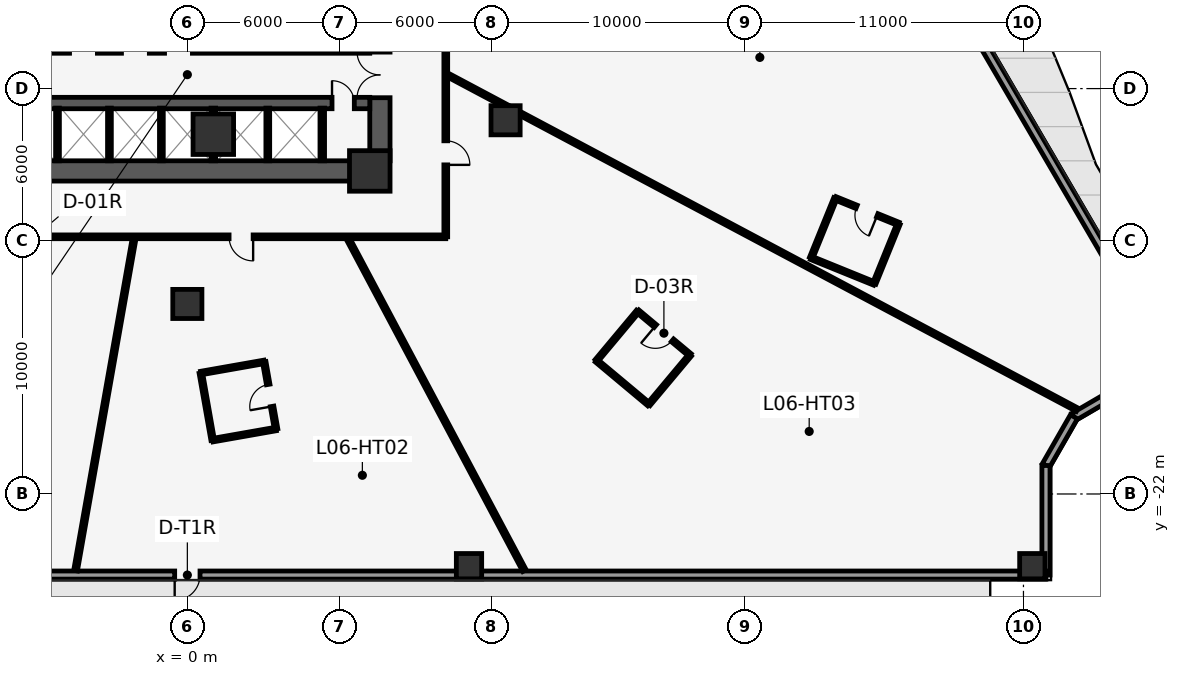
"""IFC4 building model, lengths in metres.
Left out: names, types, materials, properties, quantities, classifications, styles, units other than length and angle.
Written with IfcOpenShell. Run it as: python <this file> out.ifc"""

import sys

from ifc_helpers import new_model, si_unit, direction, frame, frame_2d, origin, origin_2d, place, context, subcontext, project, spatial, rectangle, hollow_rectangle, extrude, element, fill, save


model = new_model("IFC4")
c1 = context("Model", 3, precision=1e-05, world=origin(), true_north=direction((0.0, 1.0)))
c2 = subcontext(c1, "Body", "Model", "MODEL_VIEW")
j1 = project(units=[si_unit("LENGTHUNIT", "METRE"), si_unit("PLANEANGLEUNIT", "RADIAN")], contexts=[c1])
p1 = place(None, origin())
s1 = spatial("IfcSite", under=j1, at=p1, CompositionType="ELEMENT")
p2 = place(p1, origin())
s2 = spatial("IfcBuilding", under=s1, at=p2, CompositionType="ELEMENT")
p3 = place(p2, frame((0.0, 0.0, 34.4)))
s3 = spatial("IfcBuildingStorey", under=s2, at=p3, CompositionType="ELEMENT", Elevation=34.4)
p4 = place(p3, frame((7.6, -8.85, 0.0), z_axis=(0.0, 0.0, 1.0), x_axis=(0.0, 1.0, 0.0)))
e1 = element("IfcWall", 1, at=p4, inside=s3, PredefinedType="SHEAR", context=c2, shape_type="SweptSolid", body=[
    extrude(rectangle(XDim=8.95, YDim=0.8, at=frame_2d((4.475, 0.0))), origin(), (0.0, 0.0, 1.0), 3.75),
])
p5 = place(p4, frame((2.49, 0.0, 0.0)))
e2 = element("IfcOpeningElement", 2, at=p5, cuts=e1, PredefinedType="OPENING", context=c2, shape_type="SweptSolid", body=[
    extrude(rectangle(XDim=1.8, YDim=2.2, at=frame_2d((0.9, 1.1))), frame((0.0, 0.41, 0.0), z_axis=(0.0, -1.0, 0.0), x_axis=(1.0, 0.0, 0.0)), (0.0, 0.0, 1.0), 0.82),
])
p6 = place(p4, frame((7.4, 0.0, 0.0)))
e3 = element("IfcOpeningElement", 3, at=p6, cuts=e1, PredefinedType="OPENING", context=c2, shape_type="SweptSolid", body=[
    extrude(rectangle(XDim=1.2, YDim=2.15, at=frame_2d((0.6, 1.075))), frame((0.0, 0.41, 0.0), z_axis=(0.0, -1.0, 0.0), x_axis=(1.0, 0.0, 0.0)), (0.0, 0.0, 1.0), 0.82),
])
p7 = place(p3, frame((-7.6, -9.25, 0.0), z_axis=(0.0, 0.0, 1.0), x_axis=(1.0, 0.0, 0.0)))
e4 = element("IfcWall", 4, at=p7, inside=s3, PredefinedType="SHEAR", context=c2, shape_type="SweptSolid", body=[
    extrude(rectangle(XDim=15.2, YDim=0.8, at=frame_2d((7.6, 0.0))), origin(), (0.0, 0.0, 1.0), 3.75),
])
p8 = place(p3, frame((-7.2, -4.38, 0.0), z_axis=(0.0, 0.0, 1.0), x_axis=(1.0, 0.0, 0.0)))
e5 = element("IfcWall", 5, at=p8, inside=s3, PredefinedType="SHEAR", context=c2, shape_type="SweptSolid", body=[
    extrude(rectangle(XDim=14.4, YDim=0.45, at=frame_2d((7.2, 0.0))), origin(), (0.0, 0.0, 1.0), 3.75),
])
p9 = place(p8, frame((0.5, 0.0, 0.0)))
e6 = element("IfcOpeningElement", 6, at=p9, cuts=e5, PredefinedType="OPENING", context=c2, shape_type="SweptSolid", body=[
    extrude(rectangle(XDim=1.1, YDim=2.2, at=frame_2d((0.55, 1.1))), frame((0.0, 0.235, 0.0), z_axis=(0.0, -1.0, 0.0), x_axis=(1.0, 0.0, 0.0)), (0.0, 0.0, 1.0), 0.47),
])
p10 = place(p8, frame((2.55, 0.0, 0.0)))
e7 = element("IfcOpeningElement", 7, at=p10, cuts=e5, PredefinedType="OPENING", context=c2, shape_type="SweptSolid", body=[
    extrude(rectangle(XDim=1.1, YDim=2.2, at=frame_2d((0.55, 1.1))), frame((0.0, 0.235, 0.0), z_axis=(0.0, -1.0, 0.0), x_axis=(1.0, 0.0, 0.0)), (0.0, 0.0, 1.0), 0.47),
])
p11 = place(p8, frame((4.6, 0.0, 0.0)))
e8 = element("IfcOpeningElement", 8, at=p11, cuts=e5, PredefinedType="OPENING", context=c2, shape_type="SweptSolid", body=[
    extrude(rectangle(XDim=1.1, YDim=2.2, at=frame_2d((0.55, 1.1))), frame((0.0, 0.235, 0.0), z_axis=(0.0, -1.0, 0.0), x_axis=(1.0, 0.0, 0.0)), (0.0, 0.0, 1.0), 0.47),
])
p12 = place(p8, frame((6.3, 0.0, 0.0)))
e9 = element("IfcOpeningElement", 9, at=p12, cuts=e5, PredefinedType="OPENING", context=c2, shape_type="SweptSolid", body=[
    extrude(rectangle(XDim=1.1, YDim=2.2, at=frame_2d((0.55, 1.1))), frame((0.0, 0.235, 0.0), z_axis=(0.0, -1.0, 0.0), x_axis=(1.0, 0.0, 0.0)), (0.0, 0.0, 1.0), 0.47),
])
p13 = place(p3, frame((-7.2, -6.57, 0.0), z_axis=(0.0, 0.0, 1.0), x_axis=(1.0, 0.0, 0.0)))
e10 = element("IfcWall", 10, at=p13, inside=s3, PredefinedType="SHEAR", context=c2, shape_type="SweptSolid", body=[
    extrude(rectangle(XDim=14.4, YDim=0.45, at=frame_2d((7.2, 0.0))), origin(), (0.0, 0.0, 1.0), 3.75),
])
p14 = place(p13, frame((12.91, 0.0, 0.0)))
e11 = element("IfcOpeningElement", 11, at=p14, cuts=e10, PredefinedType="OPENING", context=c2, shape_type="SweptSolid", body=[
    extrude(rectangle(XDim=0.88, YDim=2.15, at=frame_2d((0.44, 1.075))), frame((0.0, 0.235, 0.0), z_axis=(0.0, -1.0, 0.0), x_axis=(1.0, 0.0, 0.0)), (0.0, 0.0, 1.0), 0.47),
])
for number, where, z_axis, x_axis in (
    (12, (7.2, -9.25, 0.0), (0.0, 0.0, 1.0), (1.0, 0.0, 0.0)),
    (13, (1.025, -7.8, 0.0), (0.0, 0.0, 1.0), (1.0, 0.0, 0.0)),
):
    element("IfcColumn", number, at=place(p3, frame(where, z_axis=z_axis, x_axis=x_axis)), inside=s3, PredefinedType="COLUMN", context=c2, shape_type="SweptSolid", body=[
        extrude(rectangle(XDim=1.6, YDim=1.6, at=origin_2d()), origin(), (0.0, 0.0, 1.0), 4.0),
    ])
for number, where, z_axis, x_axis in (
    (14, (12.56, -7.25, 0.0), (0.0, 0.0, 1.0), (1.0, 0.0, 0.0)),
    (15, (0.0, -14.5, 0.0), (0.0, 0.0, 1.0), (1.0, 0.0, 0.0)),
):
    element("IfcColumn", number, at=place(p3, frame(where, z_axis=z_axis, x_axis=x_axis)), inside=s3, PredefinedType="COLUMN", context=c2, shape_type="SweptSolid", body=[
        extrude(rectangle(XDim=1.15, YDim=1.15, at=origin_2d()), origin(), (0.0, 0.0, 1.0), 4.0),
    ])
for number, where, z_axis, x_axis in (
    (16, (11.117, -24.85, 0.0), (0.0, 0.0, 1.0), (1.0, 0.0, 0.0)),
    (17, (33.35, -24.85, 0.0), (0.0, 0.0, 1.0), (1.0, 0.0, 0.0)),
):
    element("IfcColumn", number, at=place(p3, frame(where, z_axis=z_axis, x_axis=x_axis)), inside=s3, PredefinedType="COLUMN", context=c2, shape_type="SweptSolid", body=[
        extrude(hollow_rectangle(XDim=1.0, YDim=1.0, WallThickness=0.06, at=origin_2d()), origin(), (0.0, 0.0, 1.0), 4.0),
    ])
p15 = place(p3, frame((4.923, 41.122, 0.0), z_axis=(0.0, 0.0, 1.0), x_axis=(0.504213113214, -0.863579258935, 0.0)))
e18 = element("IfcWall", 18, at=p15, inside=s3, PredefinedType="STANDARD", context=c2, shape_type="SweptSolid", body=[
    extrude(rectangle(XDim=67.041, YDim=0.32, at=frame_2d((33.521, 0.0))), origin(), (0.0, 0.0, 1.0), 3.75),
])
p16 = place(p15, frame((33.021, 0.0, 0.0)))
e19 = element("IfcOpeningElement", 19, at=p16, cuts=e18, PredefinedType="OPENING", context=c2, shape_type="SweptSolid", body=[
    extrude(rectangle(XDim=1.0, YDim=2.15, at=frame_2d((0.5, 1.075))), frame((0.0, 0.17, 0.0), z_axis=(0.0, -1.0, 0.0), x_axis=(1.0, 0.0, 0.0)), (0.0, 0.0, 1.0), 0.34),
])
p17 = place(p3, frame((38.726, -16.773, 0.0), z_axis=(0.0, 0.0, 1.0), x_axis=(-0.863569936823, -0.504229079105, 0.0)))
e20 = element("IfcWall", 20, at=p17, inside=s3, PredefinedType="STANDARD", context=c2, shape_type="SweptSolid", body=[
    extrude(rectangle(XDim=4.324, YDim=0.32, at=frame_2d((2.162, 0.0))), origin(), (0.0, 0.0, 1.0), 3.75),
])
p18 = place(p3, frame((34.992, -18.954, 0.0), z_axis=(0.0, 0.0, 1.0), x_axis=(-0.497881323344, -0.867245171717, 0.0)))
e21 = element("IfcWall", 21, at=p18, inside=s3, PredefinedType="STANDARD", context=c2, shape_type="SweptSolid", body=[
    extrude(rectangle(XDim=2.217, YDim=0.32, at=frame_2d((1.108, 0.0))), origin(), (0.0, 0.0, 1.0), 3.75),
])
p19 = place(p3, frame((33.888, -20.876, 0.0), z_axis=(0.0, 0.0, 1.0), x_axis=(0.0, -1.0, 0.0)))
e22 = element("IfcWall", 22, at=p19, inside=s3, PredefinedType="STANDARD", context=c2, shape_type="SweptSolid", body=[
    extrude(rectangle(XDim=4.324, YDim=0.32, at=frame_2d((2.162, 0.0))), origin(), (0.0, 0.0, 1.0), 3.75),
])
p20 = place(p3, frame((33.888, -25.2, 0.0), z_axis=(0.0, 0.0, 1.0), x_axis=(-1.0, 0.0, 0.0)))
e23 = element("IfcWall", 23, at=p20, inside=s3, PredefinedType="STANDARD", context=c2, shape_type="SweptSolid", body=[
    extrude(rectangle(XDim=67.776, YDim=0.32, at=frame_2d((33.888, 0.0))), origin(), (0.0, 0.0, 1.0), 3.75),
])
p21 = place(p20, frame((33.388, 0.0, 0.0)))
e24 = element("IfcOpeningElement", 24, at=p21, cuts=e23, PredefinedType="OPENING", context=c2, shape_type="SweptSolid", body=[
    extrude(rectangle(XDim=1.0, YDim=2.15, at=frame_2d((0.5, 1.075))), frame((0.0, 0.17, 0.0), z_axis=(0.0, -1.0, 0.0), x_axis=(1.0, 0.0, 0.0)), (0.0, 0.0, 1.0), 0.34),
])
p22 = place(p3, frame((-38.726, -16.773, 0.0), z_axis=(0.0, 0.0, 1.0), x_axis=(0.504213113214, 0.863579258935, 0.0)))
e25 = element("IfcWall", 25, at=p22, inside=s3, PredefinedType="STANDARD", context=c2, shape_type="SweptSolid", body=[
    extrude(rectangle(XDim=67.041, YDim=0.32, at=frame_2d((33.521, 0.0))), origin(), (0.0, 0.0, 1.0), 3.75),
])
p23 = place(p22, frame((33.021, 0.0, 0.0)))
e26 = element("IfcOpeningElement", 26, at=p23, cuts=e25, PredefinedType="OPENING", context=c2, shape_type="SweptSolid", body=[
    extrude(rectangle(XDim=1.0, YDim=2.15, at=frame_2d((0.5, 1.075))), frame((0.0, 0.17, 0.0), z_axis=(0.0, -1.0, 0.0), x_axis=(1.0, 0.0, 0.0)), (0.0, 0.0, 1.0), 0.34),
])
for number, where, z_axis, x_axis in (
    (27, (-5.125, -8.85, 0.0), (0.0, 0.0, 1.0), (0.0, 1.0, 0.0)),
    (28, (-3.075, -8.85, 0.0), (0.0, 0.0, 1.0), (0.0, 1.0, 0.0)),
    (29, (-1.025, -8.85, 0.0), (0.0, 0.0, 1.0), (0.0, 1.0, 0.0)),
):
    element("IfcWall", number, at=place(p3, frame(where, z_axis=z_axis, x_axis=x_axis)), inside=s3, PredefinedType="PARTITIONING", context=c2, shape_type="SweptSolid", body=[
        extrude(rectangle(XDim=2.08, YDim=0.15, at=frame_2d((1.04, 0.0))), origin(), (0.0, 0.0, 1.0), 3.75),
    ])
p24 = place(p3, frame((1.025, -8.85, 0.0), z_axis=(0.0, 0.0, 1.0), x_axis=(0.0, 1.0, 0.0)))
e30 = element("IfcWall", 30, at=p24, inside=s3, PredefinedType="PARTITIONING", context=c2, shape_type="SweptSolid", body=[
    extrude(rectangle(XDim=2.08, YDim=0.18, at=frame_2d((1.04, 0.0))), origin(), (0.0, 0.0, 1.0), 2.798),
])
p25 = place(p3, frame((3.175, -8.85, 0.0), z_axis=(0.0, 0.0, 1.0), x_axis=(0.0, 1.0, 0.0)))
e31 = element("IfcWall", 31, at=p25, inside=s3, PredefinedType="PARTITIONING", context=c2, shape_type="SweptSolid", body=[
    extrude(rectangle(XDim=2.08, YDim=0.15, at=frame_2d((1.04, 0.0))), origin(), (0.0, 0.0, 1.0), 3.75),
])
p26 = place(p3, frame((5.325, -8.85, 0.0), z_axis=(0.0, 0.0, 1.0), x_axis=(0.0, 1.0, 0.0)))
e32 = element("IfcWall", 32, at=p26, inside=s3, PredefinedType="PARTITIONING", context=c2, shape_type="SweptSolid", body=[
    extrude(rectangle(XDim=2.08, YDim=0.18, at=frame_2d((1.04, 0.0))), origin(), (0.0, 0.0, 1.0), 3.75),
])
p27 = place(p3, frame((10.2, 12.15, 0.0), z_axis=(0.0, 0.0, 1.0), x_axis=(0.0, -1.0, 0.0)))
e33 = element("IfcWall", 33, at=p27, inside=s3, PredefinedType="PARTITIONING", context=c2, shape_type="SweptSolid", body=[
    extrude(rectangle(XDim=24.0, YDim=0.15, at=frame_2d((12.0, 0.0))), origin(), (0.0, 0.0, 1.0), 3.75),
])
p28 = place(p27, frame((20.211, 0.0, 0.0)))
e34 = element("IfcOpeningElement", 34, at=p28, cuts=e33, PredefinedType="OPENING", context=c2, shape_type="SweptSolid", body=[
    extrude(rectangle(XDim=0.95, YDim=2.15, at=frame_2d((0.475, 1.075))), frame((0.0, 0.085, 0.0), z_axis=(0.0, -1.0, 0.0), x_axis=(1.0, 0.0, 0.0)), (0.0, 0.0, 1.0), 0.17),
])
p29 = place(p27, frame((14.05, 0.0, 0.0)))
e35 = element("IfcOpeningElement", 35, at=p29, cuts=e33, PredefinedType="OPENING", context=c2, shape_type="SweptSolid", body=[
    extrude(rectangle(XDim=0.95, YDim=2.15, at=frame_2d((0.475, 1.075))), frame((0.0, 0.085, 0.0), z_axis=(0.0, -1.0, 0.0), x_axis=(1.0, 0.0, 0.0)), (0.0, 0.0, 1.0), 0.17),
])
p30 = place(p27, frame((7.292, 0.0, 0.0)))
e36 = element("IfcOpeningElement", 36, at=p30, cuts=e33, PredefinedType="OPENING", context=c2, shape_type="SweptSolid", body=[
    extrude(rectangle(XDim=0.95, YDim=2.15, at=frame_2d((0.475, 1.075))), frame((0.0, 0.085, 0.0), z_axis=(0.0, -1.0, 0.0), x_axis=(1.0, 0.0, 0.0)), (0.0, 0.0, 1.0), 0.17),
])
p31 = place(p3, frame((10.2, -11.85, 0.0), z_axis=(0.0, 0.0, 1.0), x_axis=(-1.0, 0.0, 0.0)))
e37 = element("IfcWall", 37, at=p31, inside=s3, PredefinedType="PARTITIONING", context=c2, shape_type="SweptSolid", body=[
    extrude(rectangle(XDim=20.4, YDim=0.15, at=frame_2d((10.2, 0.0))), origin(), (0.0, 0.0, 1.0), 3.75),
])
p32 = place(p31, frame((15.749, 0.0, 0.0)))
e38 = element("IfcOpeningElement", 38, at=p32, cuts=e37, PredefinedType="OPENING", context=c2, shape_type="SweptSolid", body=[
    extrude(rectangle(XDim=0.95, YDim=2.15, at=frame_2d((0.475, 1.075))), frame((0.0, 0.085, 0.0), z_axis=(0.0, -1.0, 0.0), x_axis=(1.0, 0.0, 0.0)), (0.0, 0.0, 1.0), 0.17),
])
p33 = place(p31, frame((7.604, 0.0, 0.0)))
e39 = element("IfcOpeningElement", 39, at=p33, cuts=e37, PredefinedType="OPENING", context=c2, shape_type="SweptSolid", body=[
    extrude(rectangle(XDim=0.95, YDim=2.15, at=frame_2d((0.475, 1.075))), frame((0.0, 0.085, 0.0), z_axis=(0.0, -1.0, 0.0), x_axis=(1.0, 0.0, 0.0)), (0.0, 0.0, 1.0), 0.17),
])
p34 = place(p3, frame((-2.108, -11.955, 0.0), z_axis=(0.0, 0.0, 1.0), x_axis=(-0.173657301911, -0.984806144118, 0.0)))
e40 = element("IfcWall", 40, at=p34, inside=s3, PredefinedType="PARTITIONING", context=c2, shape_type="SweptSolid", body=[
    extrude(rectangle(XDim=13.271, YDim=0.15, at=frame_2d((6.636, 0.0))), origin(), (0.0, 0.0, 1.0), 3.75),
])
p35 = place(p3, frame((6.357, -11.955, 0.0), z_axis=(0.0, 0.0, 1.0), x_axis=(0.469464713073, -0.882951234882, 0.0)))
e41 = element("IfcWall", 41, at=p35, inside=s3, PredefinedType="PARTITIONING", context=c2, shape_type="SweptSolid", body=[
    extrude(rectangle(XDim=14.802, YDim=0.15, at=frame_2d((7.401, 0.0))), origin(), (0.0, 0.0, 1.0), 3.75),
])
p36 = place(p3, frame((10.305, -5.479, 0.0), z_axis=(0.0, 0.0, 1.0), x_axis=(0.882948770752, -0.469469347484, 0.0)))
e42 = element("IfcWall", 42, at=p36, inside=s3, PredefinedType="PARTITIONING", context=c2, shape_type="SweptSolid", body=[
    extrude(rectangle(XDim=28.107, YDim=0.15, at=frame_2d((14.054, 0.0))), origin(), (0.0, 0.0, 1.0), 2.798),
])
p37 = place(p3, frame((0.533, -17.227, 0.0), z_axis=(0.0, 0.0, 1.0), x_axis=(0.173707672725, -0.984797260575, 0.0)))
e43 = element("IfcWall", 43, at=p37, inside=s3, PredefinedType="PARTITIONING", context=c2, shape_type="SweptSolid", body=[
    extrude(rectangle(XDim=2.69, YDim=0.14, at=frame_2d((1.345, 0.0))), origin(), (0.0, 0.0, 1.0), 3.75),
])
p38 = place(p3, frame((1.0, -19.876, 0.0), z_axis=(0.0, 0.0, 1.0), x_axis=(0.984799038106, 0.173697595106, 0.0)))
e44 = element("IfcWall", 44, at=p38, inside=s3, PredefinedType="PARTITIONING", context=c2, shape_type="SweptSolid", body=[
    extrude(rectangle(XDim=2.54, YDim=0.14, at=frame_2d((1.27, 0.0))), origin(), (0.0, 0.0, 1.0), 3.254),
])
p39 = place(p3, frame((3.501, -19.435, 0.0), z_axis=(0.0, 0.0, 1.0), x_axis=(-0.17363517219, 0.98481004614, 0.0)))
e45 = element("IfcWall", 45, at=p39, inside=s3, PredefinedType="PARTITIONING", context=c2, shape_type="SweptSolid", body=[
    extrude(rectangle(XDim=2.69, YDim=0.14, at=frame_2d((1.345, 0.0))), origin(), (0.0, 0.0, 1.0), 3.75),
])
p40 = place(p39, frame((0.905, 0.0, 0.0)))
e46 = element("IfcOpeningElement", 46, at=p40, cuts=e45, PredefinedType="OPENING", context=c2, shape_type="SweptSolid", body=[
    extrude(rectangle(XDim=0.88, YDim=2.1, at=frame_2d((0.44, 1.05))), frame((0.0, 0.08, 0.0), z_axis=(0.0, -1.0, 0.0), x_axis=(1.0, 0.0, 0.0)), (0.0, 0.0, 1.0), 0.16),
])
p41 = place(p3, frame((3.034, -16.786, 0.0), z_axis=(0.0, 0.0, 1.0), x_axis=(-0.98481837351, -0.173587935054, 0.0)))
e47 = element("IfcWall", 47, at=p41, inside=s3, PredefinedType="PARTITIONING", context=c2, shape_type="SweptSolid", body=[
    extrude(rectangle(XDim=2.54, YDim=0.14, at=frame_2d((1.27, 0.0))), origin(), (0.0, 0.0, 1.0), 3.75),
])
p42 = place(p3, frame((16.148, -16.739, 0.0), z_axis=(0.0, 0.0, 1.0), x_axis=(0.76716376368, -0.641451291757, 0.0)))
e48 = element("IfcWall", 48, at=p42, inside=s3, PredefinedType="PARTITIONING", context=c2, shape_type="SweptSolid", body=[
    extrude(rectangle(XDim=2.69, YDim=0.14, at=frame_2d((1.345, 0.0))), origin(), (0.0, 0.0, 1.0), 3.75),
])
p43 = place(p3, frame((18.211, -18.465, 0.0), z_axis=(0.0, 0.0, 1.0), x_axis=(0.641497613341, 0.767125030277, 0.0)))
e49 = element("IfcWall", 49, at=p43, inside=s3, PredefinedType="PARTITIONING", context=c2, shape_type="SweptSolid", body=[
    extrude(rectangle(XDim=2.54, YDim=0.14, at=frame_2d((1.27, 0.0))), origin(), (0.0, 0.0, 1.0), 3.75),
])
p44 = place(p3, frame((19.841, -16.516, 0.0), z_axis=(0.0, 0.0, 1.0), x_axis=(-0.767156445247, 0.641460044364, 0.0)))
e50 = element("IfcWall", 50, at=p44, inside=s3, PredefinedType="PARTITIONING", context=c2, shape_type="SweptSolid", body=[
    extrude(rectangle(XDim=2.69, YDim=0.14, at=frame_2d((1.345, 0.0))), origin(), (0.0, 0.0, 1.0), 3.75),
])
p45 = place(p44, frame((0.905, 0.0, 0.0)))
e51 = element("IfcOpeningElement", 51, at=p45, cuts=e50, PredefinedType="OPENING", context=c2, shape_type="SweptSolid", body=[
    extrude(rectangle(XDim=0.88, YDim=2.1, at=frame_2d((0.44, 1.05))), frame((0.0, 0.08, 0.0), z_axis=(0.0, -1.0, 0.0), x_axis=(1.0, 0.0, 0.0)), (0.0, 0.0, 1.0), 0.16),
])
p46 = place(p3, frame((17.777, -14.791, 0.0), z_axis=(0.0, 0.0, 1.0), x_axis=(-0.641393743612, -0.767211877942, 0.0)))
e52 = element("IfcWall", 52, at=p46, inside=s3, PredefinedType="PARTITIONING", context=c2, shape_type="SweptSolid", body=[
    extrude(rectangle(XDim=2.54, YDim=0.14, at=frame_2d((1.27, 0.0))), origin(), (0.0, 0.0, 1.0), 3.75),
])
p47 = place(p3, frame((24.62, -12.682, 0.0), z_axis=(0.0, 0.0, 1.0), x_axis=(0.926542709205, -0.376189590524, 0.0)))
e53 = element("IfcWall", 53, at=p47, inside=s3, PredefinedType="PARTITIONING", context=c2, shape_type="SweptSolid", body=[
    extrude(rectangle(XDim=2.69, YDim=0.14, at=frame_2d((1.345, 0.0))), origin(), (0.0, 0.0, 1.0), 3.75),
])
p48 = place(p3, frame((27.113, -13.694, 0.0), z_axis=(0.0, 0.0, 1.0), x_axis=(0.376224921193, 0.926528363664, 0.0)))
e54 = element("IfcWall", 54, at=p48, inside=s3, PredefinedType="PARTITIONING", context=c2, shape_type="SweptSolid", body=[
    extrude(rectangle(XDim=2.54, YDim=0.14, at=frame_2d((1.27, 0.0))), origin(), (0.0, 0.0, 1.0), 3.75),
])
p49 = place(p3, frame((28.068, -11.341, 0.0), z_axis=(0.0, 0.0, 1.0), x_axis=(-0.926542709205, 0.376189590524, 0.0)))
e55 = element("IfcWall", 55, at=p49, inside=s3, PredefinedType="PARTITIONING", context=c2, shape_type="SweptSolid", body=[
    extrude(rectangle(XDim=2.69, YDim=0.14, at=frame_2d((1.345, 0.0))), origin(), (0.0, 0.0, 1.0), 3.75),
])
p50 = place(p49, frame((0.905, 0.0, 0.0)))
e56 = element("IfcOpeningElement", 56, at=p50, cuts=e55, PredefinedType="OPENING", context=c2, shape_type="SweptSolid", body=[
    extrude(rectangle(XDim=0.88, YDim=2.1, at=frame_2d((0.44, 1.05))), frame((0.0, 0.08, 0.0), z_axis=(0.0, -1.0, 0.0), x_axis=(1.0, 0.0, 0.0)), (0.0, 0.0, 1.0), 0.16),
])
p51 = place(p3, frame((25.576, -10.329, 0.0), z_axis=(0.0, 0.0, 1.0), x_axis=(-0.376224921193, -0.926528363664, 0.0)))
e57 = element("IfcWall", 57, at=p51, inside=s3, PredefinedType="PARTITIONING", context=c2, shape_type="SweptSolid", body=[
    extrude(rectangle(XDim=2.54, YDim=0.14, at=frame_2d((1.27, 0.0))), origin(), (0.0, 0.0, 1.0), 3.75),
])
p52 = place(p21, origin())
e58 = element("IfcDoor", 58, at=p52, inside=s3, OperationType="SINGLE_SWING_RIGHT", PredefinedType="DOOR", context=c2, shape_type="SweptSolid", body=[
    extrude(rectangle(XDim=1.0, YDim=2.15, at=frame_2d((0.5, 1.075))), frame((0.0, 0.025, 0.0), z_axis=(0.0, -1.0, 0.0), x_axis=(1.0, 0.0, 0.0)), (0.0, 0.0, 1.0), 0.05),
])
fill(e24, e58)
p53 = place(p5, origin())
e59 = element("IfcDoor", 59, at=p53, inside=s3, OperationType="DOUBLE_DOOR_SINGLE_SWING", PredefinedType="DOOR", context=c2, shape_type="SweptSolid", body=[
    extrude(rectangle(XDim=1.8, YDim=2.2, at=frame_2d((0.9, 1.1))), frame((0.0, 0.025, 0.0), z_axis=(0.0, -1.0, 0.0), x_axis=(1.0, 0.0, 0.0)), (0.0, 0.0, 1.0), 0.05),
])
fill(e2, e59)
p54 = place(p14, origin())
e60 = element("IfcDoor", 60, at=p54, inside=s3, OperationType="SINGLE_SWING_LEFT", PredefinedType="DOOR", context=c2, shape_type="SweptSolid", body=[
    extrude(rectangle(XDim=0.88, YDim=2.15, at=frame_2d((0.44, 1.075))), frame((0.0, 0.025, 0.0), z_axis=(0.0, -1.0, 0.0), x_axis=(1.0, 0.0, 0.0)), (0.0, 0.0, 1.0), 0.05),
])
fill(e11, e60)
p55 = place(p40, origin())
e61 = element("IfcDoor", 61, at=p55, inside=s3, OperationType="SINGLE_SWING_LEFT", PredefinedType="DOOR", context=c2, shape_type="SweptSolid", body=[
    extrude(rectangle(XDim=0.88, YDim=2.1, at=frame_2d((0.44, 1.05))), frame((0.0, 0.025, 0.0), z_axis=(0.0, -1.0, 0.0), x_axis=(1.0, 0.0, 0.0)), (0.0, 0.0, 1.0), 0.05),
])
fill(e46, e61)
p56 = place(p45, origin())
e62 = element("IfcDoor", 62, at=p56, inside=s3, OperationType="SINGLE_SWING_RIGHT", PredefinedType="DOOR", context=c2, shape_type="SweptSolid", body=[
    extrude(rectangle(XDim=0.88, YDim=2.1, at=frame_2d((0.44, 1.05))), frame((0.0, 0.025, 0.0), z_axis=(0.0, -1.0, 0.0), x_axis=(1.0, 0.0, 0.0)), (0.0, 0.0, 1.0), 0.05),
])
fill(e51, e62)
p57 = place(p50, origin())
e63 = element("IfcDoor", 63, at=p57, inside=s3, OperationType="SINGLE_SWING_LEFT", PredefinedType="DOOR", context=c2, shape_type="SweptSolid", body=[
    extrude(rectangle(XDim=0.88, YDim=2.1, at=frame_2d((0.44, 1.05))), frame((0.0, 0.025, 0.0), z_axis=(0.0, -1.0, 0.0), x_axis=(1.0, 0.0, 0.0)), (0.0, 0.0, 1.0), 0.05),
])
fill(e56, e63)
p58 = place(p33, origin())
e64 = element("IfcDoor", 64, at=p58, inside=s3, OperationType="SINGLE_SWING_LEFT", PredefinedType="DOOR", context=c2, shape_type="SweptSolid", body=[
    extrude(rectangle(XDim=0.95, YDim=2.15, at=frame_2d((0.475, 1.075))), frame((0.0, 0.025, 0.0), z_axis=(0.0, -1.0, 0.0), x_axis=(1.0, 0.0, 0.0)), (0.0, 0.0, 1.0), 0.05),
])
fill(e39, e64)
p59 = place(p28, origin())
e65 = element("IfcDoor", 65, at=p59, inside=s3, OperationType="SINGLE_SWING_RIGHT", PredefinedType="DOOR", context=c2, shape_type="SweptSolid", body=[
    extrude(rectangle(XDim=0.95, YDim=2.15, at=frame_2d((0.475, 1.075))), frame((0.0, 0.025, 0.0), z_axis=(0.0, -1.0, 0.0), x_axis=(1.0, 0.0, 0.0)), (0.0, 0.0, 1.0), 0.05),
])
fill(e34, e65)
save(model, sys.argv[1])
